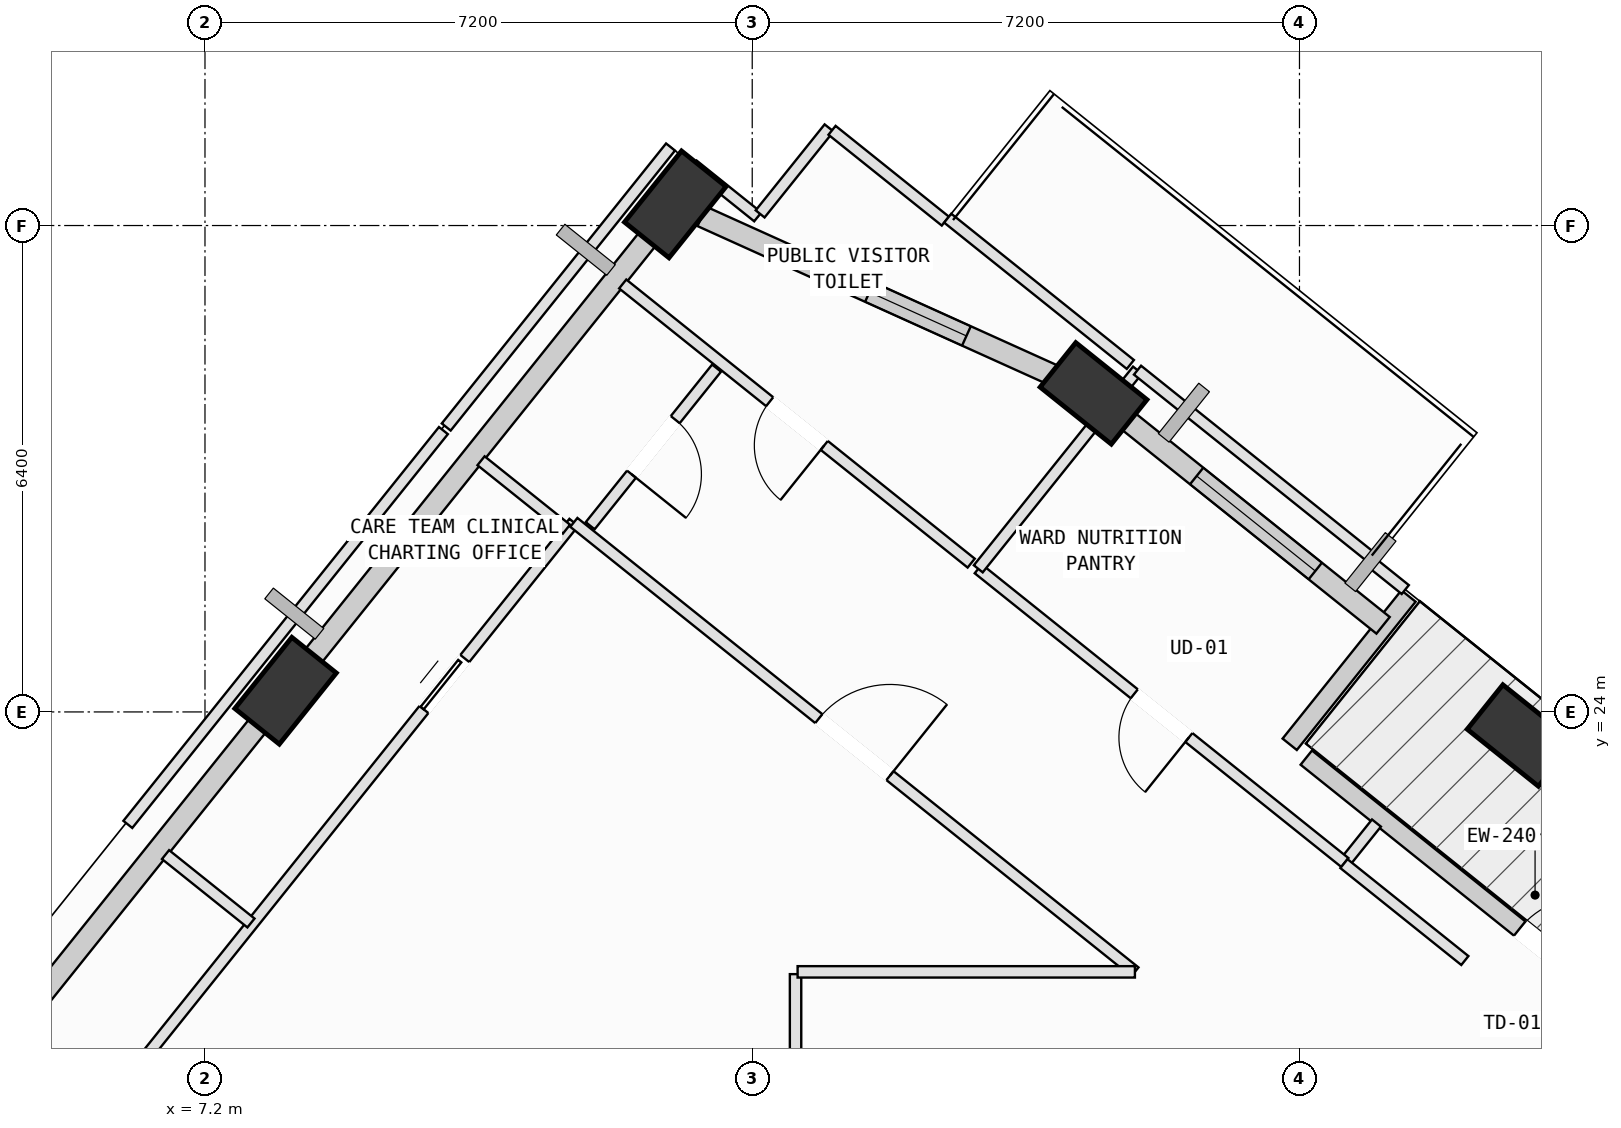
"""IFC4 building model, lengths in metres.
Left out: names, types, materials, properties, quantities, classifications, styles, units other than length and angle.
Written with IfcOpenShell. Run it as: python <this file> out.ifc"""

import sys

from ifc_helpers import new_model, si_unit, direction, frame, frame_2d, origin, origin_2d, place, context, subcontext, project, spatial, rectangle, extrude, element, fill, save


model = new_model("IFC4")
c1 = context("Model", 3, precision=1e-05, world=origin(), true_north=direction((0.0, 1.0)))
c2 = subcontext(c1, "Body", "Model", "MODEL_VIEW")
j1 = project(units=[si_unit("LENGTHUNIT", "METRE"), si_unit("PLANEANGLEUNIT", "RADIAN")], contexts=[c1])
p1 = place(None, origin())
s1 = spatial("IfcSite", under=j1, at=p1, CompositionType="ELEMENT")
p2 = place(p1, origin())
s2 = spatial("IfcBuilding", under=s1, at=p2, CompositionType="ELEMENT")
p3 = place(p2, frame((0.0, 0.0, 243.2)))
s3 = spatial("IfcBuildingStorey", under=s2, at=p3, CompositionType="ELEMENT", Elevation=243.2)
p4 = place(p3, frame((24.51, 23.69, 0.002), z_axis=(0.004883771745, -0.037605042434, 0.999280746115), x_axis=(-0.854397237481, 0.51907919368, 0.023709729507)))
e1 = element("IfcColumn", 1, at=p4, inside=s3, PredefinedType="COLUMN", context=c2, shape_type="SweptSolid", body=[
    extrude(rectangle(XDim=1.2, YDim=0.75, at=origin_2d()), origin(), (0.0, 0.0, 1.0), 3.999),
])
p5 = place(p3, frame((18.891, 28.191, 0.002), z_axis=(-0.013535743812, -0.060971818971, 0.998047704737), x_axis=(-0.626641531629, 0.778328635987, 0.039050291158)))
e2 = element("IfcColumn", 2, at=p5, inside=s3, PredefinedType="COLUMN", context=c2, shape_type="SweptSolid", body=[
    extrude(rectangle(XDim=1.2, YDim=0.75, at=origin_2d()), origin(), (0.0, 0.0, 1.0), 4.004),
])
p6 = place(p3, frame((13.387, 30.678, 0.002), z_axis=(-0.023613569545, -0.083682108569, 0.996212680123), x_axis=(0.812887941934, 0.578453483129, 0.067858394573)))
e3 = element("IfcColumn", 3, at=p6, inside=s3, PredefinedType="COLUMN", context=c2, shape_type="SweptSolid", body=[
    extrude(rectangle(XDim=1.2, YDim=0.75, at=origin_2d()), origin(), (0.0, 0.0, 1.0), 4.011),
])
p7 = place(p3, frame((8.26, 24.279, 0.002), z_axis=(0.002977078982, -0.104440791242, 0.994526650284), x_axis=(0.60287341433, 0.793658975019, 0.081541876764)))
e4 = element("IfcColumn", 4, at=p7, inside=s3, PredefinedType="COLUMN", context=c2, shape_type="SweptSolid", body=[
    extrude(rectangle(XDim=1.2, YDim=0.75, at=origin_2d()), origin(), (0.0, 0.0, 1.0), 4.018),
])
p8 = place(p3, frame((21.69, 23.399, 0.0), z_axis=(0.0, 0.0, 1.0), x_axis=(0.780444274377, -0.625225347049, 0.0)))
e5 = element("IfcWall", 5, at=p8, inside=s3, PredefinedType="SOLIDWALL", context=c2, shape_type="SweptSolid", body=[
    extrude(rectangle(XDim=6.96, YDim=0.24, at=frame_2d((3.48, 0.0))), origin(), (0.0, 0.0, 1.0), 3.265),
])
p9 = place(p8, frame((3.597, 0.0, 0.0)))
e6 = element("IfcOpeningElement", 6, at=p9, cuts=e5, PredefinedType="OPENING", context=c2, shape_type="SweptSolid", body=[
    extrude(rectangle(XDim=1.1, YDim=2.15, at=frame_2d((0.55, 1.075))), frame((0.0, 0.13, 0.0), z_axis=(0.0, -1.0, 0.0), x_axis=(1.0, 0.0, 0.0)), (0.0, 0.0, 1.0), 0.26),
])
p10 = place(p3, frame((23.035, 25.525, 0.0), z_axis=(0.0, 0.0, 1.0), x_axis=(-0.625302241823, -0.780382666626, 0.0)))
e7 = element("IfcWall", 7, at=p10, inside=s3, PredefinedType="SOLIDWALL", context=c2, shape_type="SweptSolid", body=[
    extrude(rectangle(XDim=2.5, YDim=0.24, at=frame_2d((1.25, 0.0))), origin(), (0.0, 0.0, 1.0), 3.265),
])
p11 = place(p3, frame((19.231, 27.918, 0.0), z_axis=(0.0, 0.0, 1.0), x_axis=(0.780450627947, -0.625217416054, 0.0)))
e8 = element("IfcWall", 8, at=p11, inside=s3, PredefinedType="SOLIDWALL", context=c2, shape_type="SweptSolid", body=[
    extrude(rectangle(XDim=4.445, YDim=0.28, at=frame_2d((2.222, 0.0))), origin(), (0.0, 0.0, 1.0), 3.265),
])
p12 = place(p11, frame((1.302, 0.0, 0.75)))
e9 = element("IfcOpeningElement", 9, at=p12, cuts=e8, PredefinedType="OPENING", context=c2, shape_type="SweptSolid", body=[
    extrude(rectangle(XDim=2.0, YDim=1.95, at=frame_2d((1.0, 0.975))), frame((0.0, 0.15, 0.0), z_axis=(0.0, -1.0, 0.0), x_axis=(1.0, 0.0, 0.0)), (0.0, 0.0, 1.0), 0.3),
])
p13 = place(p3, frame((13.738, 30.52, 0.0), z_axis=(0.0, 0.0, 1.0), x_axis=(0.911272519656, -0.411803830629, 0.0)))
e10 = element("IfcWall", 10, at=p13, inside=s3, PredefinedType="SOLIDWALL", context=c2, shape_type="SweptSolid", body=[
    extrude(rectangle(XDim=5.302, YDim=0.28, at=frame_2d((2.651, 0.0))), origin(), (0.0, 0.0, 1.0), 3.265),
])
p14 = place(p13, frame((2.42, 0.0, 0.75)))
e11 = element("IfcOpeningElement", 11, at=p14, cuts=e10, PredefinedType="OPENING", context=c2, shape_type="SweptSolid", body=[
    extrude(rectangle(XDim=1.4, YDim=1.85, at=frame_2d((0.7, 0.925))), frame((0.0, 0.15, 0.0), z_axis=(0.0, -1.0, 0.0), x_axis=(1.0, 0.0, 0.0)), (0.0, 0.0, 1.0), 0.3),
])
p15 = place(p3, frame((8.394, 24.446, 0.0), z_axis=(0.0, 0.0, 1.0), x_axis=(0.625251576487, 0.780423260866, 0.0)))
e12 = element("IfcWall", 12, at=p15, inside=s3, PredefinedType="SOLIDWALL", context=c2, shape_type="SweptSolid", body=[
    extrude(rectangle(XDim=7.434, YDim=0.28, at=frame_2d((3.717, 0.0))), origin(), (0.0, 0.0, 1.0), 3.265),
])
p16 = place(p3, frame((3.247, 18.021, 0.0), z_axis=(0.0, 0.0, 1.0), x_axis=(0.625235891267, 0.780435827132, 0.0)))
e13 = element("IfcWall", 13, at=p16, inside=s3, PredefinedType="SOLIDWALL", context=c2, shape_type="SweptSolid", body=[
    extrude(rectangle(XDim=7.485, YDim=0.28, at=frame_2d((3.742, 0.0))), origin(), (0.0, 0.0, 1.0), 3.265),
])
p17 = place(p3, frame((14.97, 20.55, 0.0), z_axis=(0.0, 0.0, 1.0), x_axis=(0.0, -1.0, 0.0)))
e14 = element("IfcWall", 14, at=p17, inside=s3, PredefinedType="PARTITIONING", context=c2, shape_type="SweptSolid", body=[
    extrude(rectangle(XDim=2.32, YDim=0.15, at=frame_2d((1.16, 0.0))), origin(), (0.0, 0.0, 1.0), 3.78),
])
p18 = place(p3, frame((3.756, 16.137, 0.0), z_axis=(0.0, 0.0, 1.0), x_axis=(0.625215419058, 0.780452227733, 0.0)))
e15 = element("IfcWall", 15, at=p18, inside=s3, PredefinedType="PARTITIONING", context=c2, shape_type="SweptSolid", body=[
    extrude(rectangle(XDim=13.271, YDim=0.15, at=frame_2d((6.635, 0.0))), origin(), (0.0, 0.0, 1.0), 3.78),
])
p19 = place(p18, frame((10.116, 0.0, 0.0)))
e16 = element("IfcOpeningElement", 16, at=p19, cuts=e15, PredefinedType="OPENING", context=c2, shape_type="SweptSolid", body=[
    extrude(rectangle(XDim=0.86, YDim=2.06, at=frame_2d((0.43, 1.03))), frame((0.0, 0.085, 0.0), z_axis=(0.0, -1.0, 0.0), x_axis=(1.0, 0.0, 0.0)), (0.0, 0.0, 1.0), 0.17),
])
p20 = place(p3, frame((12.053, 26.494, 0.0), z_axis=(0.0, 0.0, 1.0), x_axis=(0.780448101589, -0.62522056966, 0.0)))
e17 = element("IfcWall", 17, at=p20, inside=s3, PredefinedType="PARTITIONING", context=c2, shape_type="SweptSolid", body=[
    extrude(rectangle(XDim=9.459, YDim=0.15, at=frame_2d((4.729, 0.0))), origin(), (0.0, 0.0, 1.0), 3.415),
])
p21 = place(p20, frame((4.129, 0.0, 0.0)))
e18 = element("IfcOpeningElement", 18, at=p21, cuts=e17, PredefinedType="OPENING", context=c2, shape_type="SweptSolid", body=[
    extrude(rectangle(XDim=1.2, YDim=2.15, at=frame_2d((0.6, 1.075))), frame((0.0, 0.085, 0.0), z_axis=(0.0, -1.0, 0.0), x_axis=(1.0, 0.0, 0.0)), (0.0, 0.0, 1.0), 0.17),
])
p22 = place(p3, frame((19.435, 20.58, 0.0), z_axis=(0.0, 0.0, 1.0), x_axis=(-1.0, 0.0, 0.0)))
e19 = element("IfcWall", 19, at=p22, inside=s3, PredefinedType="PARTITIONING", context=c2, shape_type="SweptSolid", body=[
    extrude(rectangle(XDim=4.438, YDim=0.15, at=frame_2d((2.219, 0.0))), origin(), (0.0, 0.0, 1.0), 3.78),
])
p23 = place(p3, frame((22.613, 22.538, 0.0), z_axis=(0.0, 0.0, 1.0), x_axis=(-0.62541093156, -0.780295563672, 0.0)))
e20 = element("IfcWall", 20, at=p23, inside=s3, PredefinedType="PARTITIONING", context=c2, shape_type="SweptSolid", body=[
    extrude(rectangle(XDim=0.665, YDim=0.15, at=frame_2d((0.333, 0.0))), origin(), (0.0, 0.0, 1.0), 3.78),
])
p24 = place(p3, frame((22.197, 22.019, 0.0), z_axis=(0.0, 0.0, 1.0), x_axis=(-0.780425383732, 0.625248926769, 0.0)))
e21 = element("IfcWall", 21, at=p24, inside=s3, PredefinedType="PARTITIONING", context=c2, shape_type="SweptSolid", body=[
    extrude(rectangle(XDim=6.18, YDim=0.15, at=frame_2d((3.09, 0.0))), origin(), (0.0, 0.0, 1.0), 3.78),
])
p25 = place(p24, frame((2.63, 0.0, 0.0)))
e22 = element("IfcOpeningElement", 22, at=p25, cuts=e21, PredefinedType="OPENING", context=c2, shape_type="SweptSolid", body=[
    extrude(rectangle(XDim=0.92, YDim=2.1, at=frame_2d((0.46, 1.05))), frame((0.0, 0.085, 0.0), z_axis=(0.0, -1.0, 0.0), x_axis=(1.0, 0.0, 0.0)), (0.0, 0.0, 1.0), 0.17),
])
p26 = place(p3, frame((17.374, 25.883, 0.0), z_axis=(0.0, 0.0, 1.0), x_axis=(0.625379164117, 0.780321024379, 0.0)))
e23 = element("IfcWall", 23, at=p26, inside=s3, PredefinedType="PARTITIONING", context=c2, shape_type="SweptSolid", body=[
    extrude(rectangle(XDim=3.35, YDim=0.15, at=frame_2d((1.675, 0.0))), origin(), (0.0, 0.0, 1.0), 3.78),
])
p27 = place(p3, frame((19.469, 28.497, 0.0), z_axis=(0.0, 0.0, 1.0), x_axis=(0.780463757191, -0.62520102664, 0.0)))
e24 = element("IfcWall", 24, at=p27, inside=s3, PredefinedType="PARTITIONING", context=c2, shape_type="SweptSolid", body=[
    extrude(rectangle(XDim=4.0, YDim=0.15, at=frame_2d((2.0, 0.0))), origin(), (0.0, 0.0, 1.0), 3.78),
])
p28 = place(p3, frame((22.56, 25.957, 0.0), z_axis=(0.0, 0.0, 1.0), x_axis=(0.77962036012, -0.626252420424, 0.0)))
e25 = element("IfcWall", 25, at=p28, inside=s3, PredefinedType="PARTITIONING", context=c2, shape_type="SweptSolid", body=[
    extrude(rectangle(XDim=0.554, YDim=0.15, at=frame_2d((0.277, 0.0))), origin(), (0.0, 0.0, 1.0), 3.78),
])
p29 = place(p3, frame((17.281, 25.958, 0.0), z_axis=(0.0, 0.0, 1.0), x_axis=(-0.780442920932, 0.625227036497, 0.0)))
e26 = element("IfcWall", 26, at=p29, inside=s3, PredefinedType="PARTITIONING", context=c2, shape_type="SweptSolid", body=[
    extrude(rectangle(XDim=5.875, YDim=0.15, at=frame_2d((2.938, 0.0))), origin(), (0.0, 0.0, 1.0), 3.78),
])
p30 = place(p29, frame((2.477, 0.0, 0.0)))
e27 = element("IfcOpeningElement", 27, at=p30, cuts=e26, PredefinedType="OPENING", context=c2, shape_type="SweptSolid", body=[
    extrude(rectangle(XDim=0.92, YDim=2.1, at=frame_2d((0.46, 1.05))), frame((0.0, 0.085, 0.0), z_axis=(0.0, -1.0, 0.0), x_axis=(1.0, 0.0, 0.0)), (0.0, 0.0, 1.0), 0.17),
])
p31 = place(p3, frame((12.894, 30.366, 0.0), z_axis=(0.0, 0.0, 1.0), x_axis=(0.624749042452, 0.780825610463, 0.0)))
e28 = element("IfcWall", 28, at=p31, inside=s3, PredefinedType="PARTITIONING", context=c2, shape_type="SweptSolid", body=[
    extrude(rectangle(XDim=1.103, YDim=0.15, at=frame_2d((0.551, 0.0))), origin(), (0.0, 0.0, 1.0), 3.265),
])
p32 = place(p3, frame((13.622, 31.196, 0.0), z_axis=(0.0, 0.0, 1.0), x_axis=(0.780213128625, -0.625513767971, 0.0)))
e29 = element("IfcWall", 29, at=p32, inside=s3, PredefinedType="PARTITIONING", context=c2, shape_type="SweptSolid", body=[
    extrude(rectangle(XDim=1.091, YDim=0.15, at=frame_2d((0.545, 0.0))), origin(), (0.0, 0.0, 1.0), 3.78),
])
p33 = place(p3, frame((14.504, 30.553, 0.0), z_axis=(0.0, 0.0, 1.0), x_axis=(0.625577681326, 0.780161883603, 0.0)))
e30 = element("IfcWall", 30, at=p33, inside=s3, PredefinedType="PARTITIONING", context=c2, shape_type="SweptSolid", body=[
    extrude(rectangle(XDim=1.45, YDim=0.15, at=frame_2d((0.725, 0.0))), origin(), (0.0, 0.0, 1.0), 3.78),
])
p34 = place(p3, frame((15.45, 31.653, 0.0), z_axis=(0.0, 0.0, 1.0), x_axis=(0.780282600441, -0.625427104824, 0.0)))
e31 = element("IfcWall", 31, at=p34, inside=s3, PredefinedType="PARTITIONING", context=c2, shape_type="SweptSolid", body=[
    extrude(rectangle(XDim=1.911, YDim=0.15, at=frame_2d((0.956, 0.0))), origin(), (0.0, 0.0, 1.0), 3.78),
])
p35 = place(p3, frame((16.972, 30.497, 0.0), z_axis=(0.0, 0.0, 1.0), x_axis=(0.780458650179, -0.625207401876, 0.0)))
e32 = element("IfcWall", 32, at=p35, inside=s3, PredefinedType="PARTITIONING", context=c2, shape_type="SweptSolid", body=[
    extrude(rectangle(XDim=3.079, YDim=0.15, at=frame_2d((1.54, 0.0))), origin(), (0.0, 0.0, 1.0), 3.78),
])
p36 = place(p3, frame((6.185, 22.52, 0.0), z_axis=(0.0, 0.0, 1.0), x_axis=(0.625277781912, 0.780402265147, 0.0)))
e33 = element("IfcWall", 33, at=p36, inside=s3, PredefinedType="PARTITIONING", context=c2, shape_type="SweptSolid", body=[
    extrude(rectangle(XDim=6.64, YDim=0.15, at=frame_2d((3.32, 0.0))), origin(), (0.0, 0.0, 1.0), 3.78),
])
for number, where, z_axis, x_axis in (
    (34, (10.832, 27.305, 0.0), (0.0, 0.0, 1.0), (0.781, -0.625, 0.0)),
    (35, (7.805, 21.223, 0.0), (0.0, 0.0, 1.0), (-0.781, 0.625, 0.0)),
):
    element("IfcWall", number, at=place(p3, frame(where, z_axis=z_axis, x_axis=x_axis)), inside=s3, PredefinedType="PARTITIONING", context=c2, shape_type="SweptSolid", body=[
        extrude(rectangle(XDim=1.44, YDim=0.15, at=frame_2d((0.72, 0.0))), origin(), (0.0, 0.0, 1.0), 3.78),
    ])
p37 = place(p3, frame((13.931, 28.524, 0.0), z_axis=(0.0, 0.0, 1.0), x_axis=(-0.625534702832, -0.780196344232, 0.0)))
e36 = element("IfcWall", 36, at=p37, inside=s3, PredefinedType="PARTITIONING", context=c2, shape_type="SweptSolid", body=[
    extrude(rectangle(XDim=2.658, YDim=0.15, at=frame_2d((1.329, 0.0))), origin(), (0.0, 0.0, 1.0), 3.78),
])
p38 = place(p37, frame((0.869, 0.0, 0.0)))
e37 = element("IfcOpeningElement", 37, at=p38, cuts=e36, PredefinedType="OPENING", context=c2, shape_type="SweptSolid", body=[
    extrude(rectangle(XDim=0.92, YDim=2.1, at=frame_2d((0.46, 1.05))), frame((0.0, 0.085, 0.0), z_axis=(0.0, -1.0, 0.0), x_axis=(1.0, 0.0, 0.0)), (0.0, 0.0, 1.0), 0.17),
])
p39 = place(p3, frame((10.374, 27.749, 0.0), z_axis=(0.0, 0.0, 1.0), x_axis=(0.625168003158, 0.780490209949, 0.0)))
e38 = element("IfcWall", 38, at=p39, inside=s3, PredefinedType="PARTITIONING", context=c2, shape_type="SweptSolid", body=[
    extrude(rectangle(XDim=4.72, YDim=0.15, at=frame_2d((2.36, 0.0))), origin(), (0.0, 0.0, 1.0), 3.78),
])
p40 = place(p3, frame((22.185, 22.004, 0.0), z_axis=(0.0, 0.0, 1.0), x_axis=(0.78033107822, -0.625366619163, 0.0)))
e39 = element("IfcWall", 39, at=p40, inside=s3, PredefinedType="PARTITIONING", context=c2, shape_type="SweptSolid", body=[
    extrude(rectangle(XDim=2.039, YDim=0.15, at=frame_2d((1.019, 0.0))), origin(), (0.0, 0.0, 1.0), 3.415),
])
p41 = place(p9, origin())
e40 = element("IfcDoor", 40, at=p41, inside=s3, OperationType="SINGLE_SWING_RIGHT", PredefinedType="DOOR", context=c2, shape_type="SweptSolid", body=[
    extrude(rectangle(XDim=1.1, YDim=2.15, at=frame_2d((0.55, 1.075))), frame((0.0, 0.025, 0.0), z_axis=(0.0, -1.0, 0.0), x_axis=(1.0, 0.0, 0.0)), (0.0, 0.0, 1.0), 0.05),
])
fill(e6, e40)
p42 = place(p12, origin())
e41 = element("IfcWindow", 41, at=p42, inside=s3, PartitioningType="SINGLE_PANEL", PredefinedType="WINDOW", context=c2, shape_type="SweptSolid", body=[
    extrude(rectangle(XDim=2.0, YDim=1.95, at=frame_2d((1.0, 0.975))), frame((0.0, 0.03, 0.0), z_axis=(0.0, -1.0, 0.0), x_axis=(1.0, 0.0, 0.0)), (0.0, 0.0, 1.0), 0.06),
])
fill(e9, e41)
p43 = place(p14, origin())
e42 = element("IfcWindow", 42, at=p43, inside=s3, PartitioningType="SINGLE_PANEL", PredefinedType="WINDOW", context=c2, shape_type="SweptSolid", body=[
    extrude(rectangle(XDim=1.4, YDim=1.85, at=frame_2d((0.7, 0.925))), frame((0.0, 0.03, 0.0), z_axis=(0.0, -1.0, 0.0), x_axis=(1.0, 0.0, 0.0)), (0.0, 0.0, 1.0), 0.06),
])
fill(e11, e42)
p44 = place(p21, origin())
e43 = element("IfcDoor", 43, at=p44, inside=s3, OperationType="SINGLE_SWING_RIGHT", PredefinedType="DOOR", context=c2, shape_type="SweptSolid", body=[
    extrude(rectangle(XDim=1.2, YDim=2.15, at=frame_2d((0.6, 1.075))), frame((0.0, 0.025, 0.0), z_axis=(0.0, -1.0, 0.0), x_axis=(1.0, 0.0, 0.0)), (0.0, 0.0, 1.0), 0.05),
])
fill(e18, e43)
p45 = place(p25, origin())
e44 = element("IfcDoor", 44, at=p45, inside=s3, OperationType="SINGLE_SWING_LEFT", PredefinedType="DOOR", context=c2, shape_type="SweptSolid", body=[
    extrude(rectangle(XDim=0.92, YDim=2.1, at=frame_2d((0.46, 1.05))), frame((0.0, 0.025, 0.0), z_axis=(0.0, -1.0, 0.0), x_axis=(1.0, 0.0, 0.0)), (0.0, 0.0, 1.0), 0.05),
])
fill(e22, e44)
p46 = place(p30, origin())
e45 = element("IfcDoor", 45, at=p46, inside=s3, OperationType="SINGLE_SWING_LEFT", PredefinedType="DOOR", context=c2, shape_type="SweptSolid", body=[
    extrude(rectangle(XDim=0.92, YDim=2.1, at=frame_2d((0.46, 1.05))), frame((0.0, 0.025, 0.0), z_axis=(0.0, -1.0, 0.0), x_axis=(1.0, 0.0, 0.0)), (0.0, 0.0, 1.0), 0.05),
])
fill(e27, e45)
p47 = place(p38, origin())
e46 = element("IfcDoor", 46, at=p47, inside=s3, OperationType="SINGLE_SWING_RIGHT", PredefinedType="DOOR", context=c2, shape_type="SweptSolid", body=[
    extrude(rectangle(XDim=0.92, YDim=2.1, at=frame_2d((0.46, 1.05))), frame((0.0, 0.025, 0.0), z_axis=(0.0, -1.0, 0.0), x_axis=(1.0, 0.0, 0.0)), (0.0, 0.0, 1.0), 0.05),
])
fill(e37, e46)
p48 = place(p19, origin())
e47 = element("IfcDoor", 47, at=p48, inside=s3, OperationType="SLIDING_TO_LEFT", PredefinedType="DOOR", context=c2, shape_type="SweptSolid", body=[
    extrude(rectangle(XDim=0.86, YDim=2.06, at=frame_2d((0.43, 1.03))), frame((0.0, 0.025, 0.0), z_axis=(0.0, -1.0, 0.0), x_axis=(1.0, 0.0, 0.0)), (0.0, 0.0, 1.0), 0.05),
])
fill(e16, e47)
save(model, sys.argv[1])
